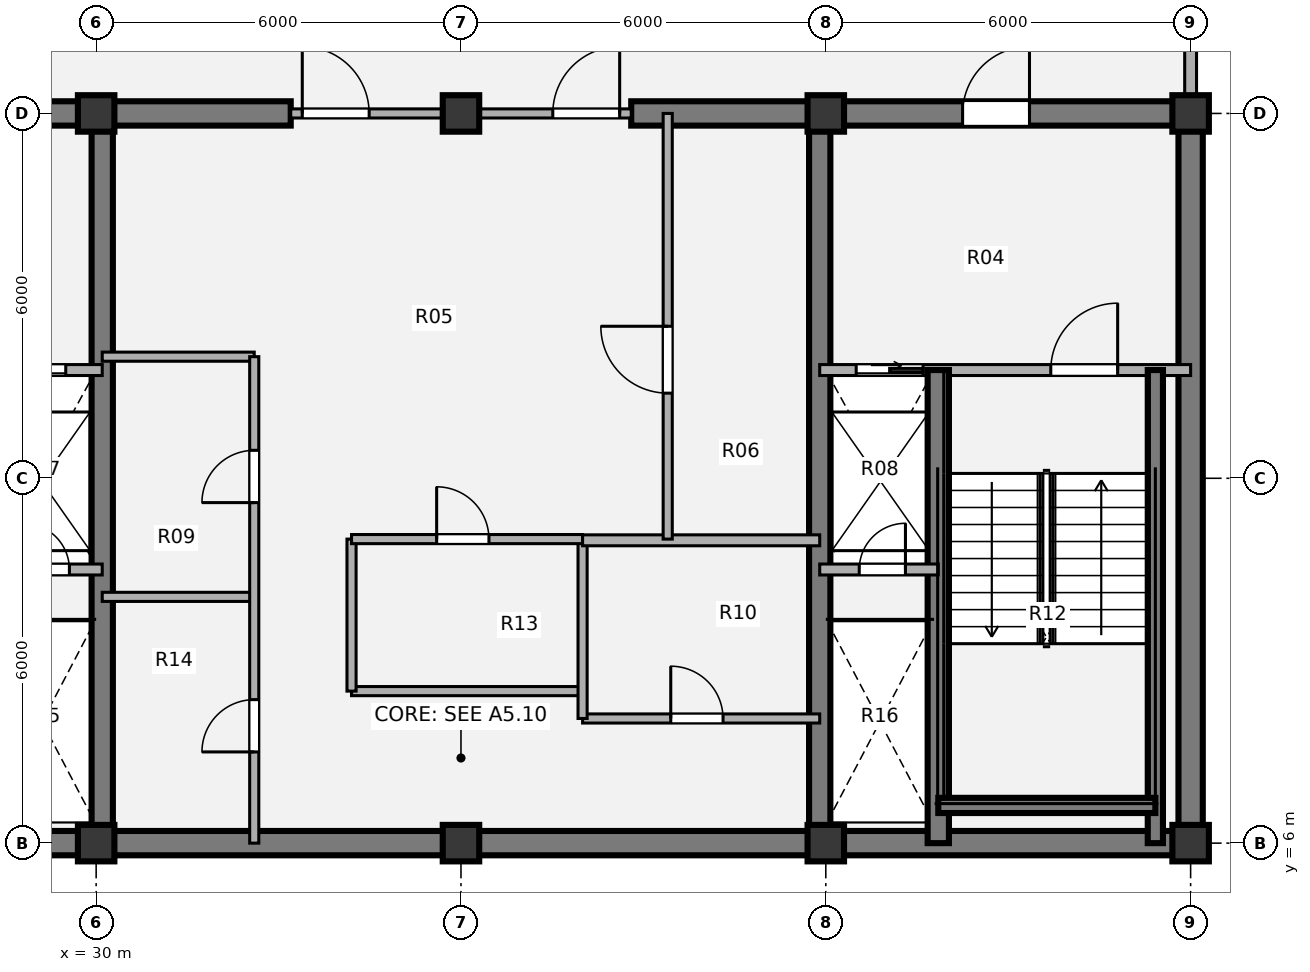
"""IFC4 building model, lengths in metres.
Left out: names, types, materials, properties, quantities, classifications, styles, units other than length and angle.
Written with IfcOpenShell. Run it as: python <this file> out.ifc"""

import sys

from ifc_helpers import new_model, si_unit, direction, frame, frame_2d, origin, origin_2d, place, context, subcontext, project, spatial, rectangle, extrude, source, transform, mapped, element, fill, save


model = new_model("IFC4")
c1 = context("Model", 3, precision=1e-05, world=origin(), true_north=direction((0.0, 1.0)))
c2 = subcontext(c1, "Body", "Model", "MODEL_VIEW")
j1 = project(units=[si_unit("LENGTHUNIT", "METRE"), si_unit("PLANEANGLEUNIT", "RADIAN")], contexts=[c1])
p1 = place(None, origin())
s1 = spatial("IfcSite", under=j1, at=p1, CompositionType="ELEMENT")
p2 = place(p1, origin())
s2 = spatial("IfcBuilding", under=s1, at=p2, CompositionType="ELEMENT")
p3 = place(p2, frame((0.0, 0.0, 299.88)))
s3 = spatial("IfcBuildingStorey", under=s2, at=p3, CompositionType="ELEMENT", Elevation=299.88)
m1 = source(origin(), c2, "Body", "SweptSolid", [
    extrude(rectangle(XDim=0.6, YDim=0.6, at=origin_2d()), origin(), (0.0, 0.0, 1.0), 3.96),
])
for number, where, z_axis, x_axis in (
    (1, (30.0, 6.0, 0.0), (0.0, 0.0, 1.0), (1.0, 0.0, 0.0)),
    (2, (36.0, 6.0, 0.0), (0.0, 0.0, 1.0), (1.0, 0.0, 0.0)),
    (3, (42.0, 6.0, 0.0), (0.0, 0.0, 1.0), (1.0, 0.0, 0.0)),
    (4, (48.0, 6.0, 0.0), (0.0, 0.0, 1.0), (1.0, 0.0, 0.0)),
    (5, (30.0, 18.0, 0.0), (0.0, 0.0, 1.0), (1.0, 0.0, 0.0)),
    (6, (36.0, 18.0, 0.0), (0.0, 0.0, 1.0), (1.0, 0.0, 0.0)),
    (7, (42.0, 18.0, 0.0), (0.0, 0.0, 1.0), (1.0, 0.0, 0.0)),
    (8, (48.0, 18.0, 0.0), (0.0, 0.0, 1.0), (1.0, 0.0, 0.0)),
):
    element("IfcColumn", number, at=place(p3, frame(where, z_axis=z_axis, x_axis=x_axis)), inside=s3, PredefinedType="COLUMN", context=c2, shape_type="MappedRepresentation", body=[
        mapped(m1, transform((0.0, 0.0, 0.0), x_axis=(1.0, 0.0, 0.0), y_axis=(0.0, 1.0, 0.0), z_axis=(0.0, 0.0, 1.0), scale=1.0)),
    ])
p4 = place(p3, frame((48.2, 6.0, 0.0), z_axis=(0.0, 0.0, 1.0), x_axis=(-1.0, 0.0, 0.0)))
e9 = element("IfcWall", 9, at=p4, inside=s3, PredefinedType="SHEAR", context=c2, shape_type="SweptSolid", body=[
    extrude(rectangle(XDim=24.4, YDim=0.4, at=frame_2d((12.2, 0.0))), origin(), (0.0, 0.0, 1.0), 3.96),
])
p5 = place(p3, frame((48.0, 18.0, 0.0), z_axis=(0.0, 0.0, 1.0), x_axis=(0.0, -1.0, 0.0)))
e10 = element("IfcWall", 10, at=p5, inside=s3, PredefinedType="SHEAR", context=c2, shape_type="SweptSolid", body=[
    extrude(rectangle(XDim=12.0, YDim=0.4, at=frame_2d((6.0, 0.0))), origin(), (0.0, 0.0, 1.0), 3.96),
])
p6 = place(p3, frame((23.8, 18.0, 0.0), z_axis=(0.0, 0.0, 1.0), x_axis=(1.0, 0.0, 0.0)))
e11 = element("IfcWall", 11, at=p6, inside=s3, PredefinedType="SHEAR", context=c2, shape_type="SweptSolid", body=[
    extrude(rectangle(XDim=9.4, YDim=0.4, at=frame_2d((4.7, 0.0))), origin(), (0.0, 0.0, 1.0), 3.96),
])
p7 = place(p6, frame((2.95, 0.0, 0.0)))
e12 = element("IfcOpeningElement", 12, at=p7, cuts=e11, PredefinedType="OPENING", context=c2, shape_type="SweptSolid", body=[
    extrude(rectangle(XDim=1.1, YDim=2.1, at=origin_2d()), frame((0.55, 0.21, 1.05), z_axis=(0.0, -1.0, 0.0), x_axis=(1.0, 0.0, 0.0)), (0.0, 0.0, 1.0), 0.42),
])
p8 = place(p3, frame((38.8, 18.0, 0.0), z_axis=(0.0, 0.0, 1.0), x_axis=(1.0, 0.0, 0.0)))
e13 = element("IfcWall", 13, at=p8, inside=s3, PredefinedType="SHEAR", context=c2, shape_type="SweptSolid", body=[
    extrude(rectangle(XDim=9.4, YDim=0.4, at=frame_2d((4.7, 0.0))), origin(), (0.0, 0.0, 1.0), 3.96),
])
p9 = place(p8, frame((5.45, 0.0, 0.0)))
e14 = element("IfcOpeningElement", 14, at=p9, cuts=e13, PredefinedType="OPENING", context=c2, shape_type="SweptSolid", body=[
    extrude(rectangle(XDim=1.1, YDim=2.1, at=origin_2d()), frame((0.55, 0.21, 1.05), z_axis=(0.0, -1.0, 0.0), x_axis=(1.0, 0.0, 0.0)), (0.0, 0.0, 1.0), 0.42),
])
for number, where, z_axis, x_axis in (
    (15, (30.1, 6.0, 0.0), (0.0, 0.0, 1.0), (0.0, 1.0, 0.0)),
    (16, (41.9, 18.0, 0.0), (0.0, 0.0, 1.0), (0.0, -1.0, 0.0)),
):
    element("IfcWall", number, at=place(p3, frame(where, z_axis=z_axis, x_axis=x_axis)), inside=s3, PredefinedType="SHEAR", context=c2, shape_type="SweptSolid", body=[
        extrude(rectangle(XDim=12.0, YDim=0.35, at=frame_2d((6.0, 0.0))), origin(), (0.0, 0.0, 1.0), 3.96),
    ])
p10 = place(p3, frame((48.0, 21.05, 0.0), z_axis=(0.0, 0.0, 1.0), x_axis=(0.0, -1.0, 0.0)))
e17 = element("IfcWall", 17, at=p10, inside=s3, PredefinedType="SOLIDWALL", context=c2, shape_type="SweptSolid", body=[
    extrude(rectangle(XDim=2.77, YDim=0.195, at=frame_2d((1.385, 0.0))), origin(), (0.0, 0.0, 1.0), 2.898),
])
p11 = place(p3, frame((30.1, 14.0, 0.0), z_axis=(0.0, 0.0, 1.0), x_axis=(1.0, 0.0, 0.0)))
e18 = element("IfcWall", 18, at=p11, inside=s3, PredefinedType="PARTITIONING", context=c2, shape_type="SweptSolid", body=[
    extrude(rectangle(XDim=2.5, YDim=0.15, at=frame_2d((1.25, 0.0))), origin(), (0.0, 0.0, 1.0), 3.68),
])
p12 = place(p3, frame((34.2, 8.5, 0.0), z_axis=(0.0, 0.0, 1.0), x_axis=(1.0, 0.0, 0.0)))
e19 = element("IfcWall", 19, at=p12, inside=s3, PredefinedType="PARTITIONING", context=c2, shape_type="SweptSolid", body=[
    extrude(rectangle(XDim=3.8, YDim=0.15, at=frame_2d((1.9, 0.0))), origin(), (0.0, 0.0, 1.0), 3.68),
])
p13 = place(p3, frame((38.0, 8.05, 0.0), z_axis=(0.0, 0.0, 1.0), x_axis=(1.0, 0.0, 0.0)))
e20 = element("IfcWall", 20, at=p13, inside=s3, PredefinedType="PARTITIONING", context=c2, shape_type="SweptSolid", body=[
    extrude(rectangle(XDim=3.9, YDim=0.15, at=frame_2d((1.95, 0.0))), origin(), (0.0, 0.0, 1.0), 3.68),
])
p14 = place(p13, frame((1.45, 0.0, 0.0)))
e21 = element("IfcOpeningElement", 21, at=p14, cuts=e20, PredefinedType="OPENING", context=c2, shape_type="SweptSolid", body=[
    extrude(rectangle(XDim=0.86, YDim=2.1, at=origin_2d()), frame((0.43, 0.085, 1.05), z_axis=(0.0, -1.0, 0.0), x_axis=(1.0, 0.0, 0.0)), (0.0, 0.0, 1.0), 0.17),
])
p15 = place(p3, frame((34.2, 8.5, 0.0), z_axis=(0.0, 0.0, 1.0), x_axis=(0.0, 1.0, 0.0)))
e22 = element("IfcWall", 22, at=p15, inside=s3, PredefinedType="PARTITIONING", context=c2, shape_type="SweptSolid", body=[
    extrude(rectangle(XDim=2.5, YDim=0.15, at=frame_2d((1.25, 0.0))), origin(), (0.0, 0.0, 1.0), 3.68),
])
p16 = place(p3, frame((38.0, 8.05, 0.0), z_axis=(0.0, 0.0, 1.0), x_axis=(0.0, 1.0, 0.0)))
e23 = element("IfcWall", 23, at=p16, inside=s3, PredefinedType="PARTITIONING", context=c2, shape_type="SweptSolid", body=[
    extrude(rectangle(XDim=2.95, YDim=0.15, at=frame_2d((1.475, 0.0))), origin(), (0.0, 0.0, 1.0), 3.68),
])
p17 = place(p3, frame((34.2, 11.0, 0.0), z_axis=(0.0, 0.0, 1.0), x_axis=(1.0, 0.0, 0.0)))
e24 = element("IfcWall", 24, at=p17, inside=s3, PredefinedType="PARTITIONING", context=c2, shape_type="SweptSolid", body=[
    extrude(rectangle(XDim=3.8, YDim=0.15, at=frame_2d((1.9, 0.0))), origin(), (0.0, 0.0, 1.0), 3.68),
])
p18 = place(p17, frame((1.4, 0.0, 0.0)))
e25 = element("IfcOpeningElement", 25, at=p18, cuts=e24, PredefinedType="OPENING", context=c2, shape_type="SweptSolid", body=[
    extrude(rectangle(XDim=0.86, YDim=2.1, at=origin_2d()), frame((0.43, 0.085, 1.05), z_axis=(0.0, -1.0, 0.0), x_axis=(1.0, 0.0, 0.0)), (0.0, 0.0, 1.0), 0.17),
])
p19 = place(p3, frame((38.0, 10.98, 0.0), z_axis=(0.0, 0.0, 1.0), x_axis=(1.0, 0.0, 0.0)))
e26 = element("IfcWall", 26, at=p19, inside=s3, PredefinedType="PARTITIONING", context=c2, shape_type="SweptSolid", body=[
    extrude(rectangle(XDim=3.9, YDim=0.18, at=frame_2d((1.95, 0.0))), origin(), (0.0, 0.0, 1.0), 3.68),
])
p20 = place(p3, frame((39.4, 11.0, 0.0), z_axis=(0.0, 0.0, 1.0), x_axis=(0.0, 1.0, 0.0)))
e27 = element("IfcWall", 27, at=p20, inside=s3, PredefinedType="PARTITIONING", context=c2, shape_type="SweptSolid", body=[
    extrude(rectangle(XDim=7.0, YDim=0.15, at=frame_2d((3.5, 0.0))), origin(), (0.0, 0.0, 1.0), 3.68),
])
p21 = place(p20, frame((2.4, 0.0, 0.0)))
e28 = element("IfcOpeningElement", 28, at=p21, cuts=e27, PredefinedType="OPENING", context=c2, shape_type="SweptSolid", body=[
    extrude(rectangle(XDim=1.1, YDim=2.1, at=origin_2d()), frame((0.55, 0.085, 1.05), z_axis=(0.0, -1.0, 0.0), x_axis=(1.0, 0.0, 0.0)), (0.0, 0.0, 1.0), 0.17),
])
p22 = place(p3, frame((30.1, 10.05, 0.0), z_axis=(0.0, 0.0, 1.0), x_axis=(1.0, 0.0, 0.0)))
e29 = element("IfcWall", 29, at=p22, inside=s3, PredefinedType="PARTITIONING", context=c2, shape_type="SweptSolid", body=[
    extrude(rectangle(XDim=2.5, YDim=0.15, at=frame_2d((1.25, 0.0))), origin(), (0.0, 0.0, 1.0), 3.68),
])
p23 = place(p3, frame((32.6, 6.0, 0.0), z_axis=(0.0, 0.0, 1.0), x_axis=(0.0, 1.0, 0.0)))
e30 = element("IfcWall", 30, at=p23, inside=s3, PredefinedType="PARTITIONING", context=c2, shape_type="SweptSolid", body=[
    extrude(rectangle(XDim=8.0, YDim=0.15, at=frame_2d((4.0, 0.0))), origin(), (0.0, 0.0, 1.0), 3.68),
])
p24 = place(p23, frame((1.5, 0.0, 0.0)))
e31 = element("IfcOpeningElement", 31, at=p24, cuts=e30, PredefinedType="OPENING", context=c2, shape_type="SweptSolid", body=[
    extrude(rectangle(XDim=0.86, YDim=2.1, at=origin_2d()), frame((0.43, 0.085, 1.05), z_axis=(0.0, -1.0, 0.0), x_axis=(1.0, 0.0, 0.0)), (0.0, 0.0, 1.0), 0.17),
])
p25 = place(p23, frame((5.6, 0.0, 0.0)))
e32 = element("IfcOpeningElement", 32, at=p25, cuts=e30, PredefinedType="OPENING", context=c2, shape_type="SweptSolid", body=[
    extrude(rectangle(XDim=0.86, YDim=2.1, at=origin_2d()), frame((0.43, 0.085, 1.05), z_axis=(0.0, -1.0, 0.0), x_axis=(1.0, 0.0, 0.0)), (0.0, 0.0, 1.0), 0.17),
])
p26 = place(p3, frame((33.2, 18.0, 0.0), z_axis=(0.0, 0.0, 1.0), x_axis=(1.0, 0.0, 0.0)))
e33 = element("IfcWall", 33, at=p26, inside=s3, PredefinedType="PARTITIONING", context=c2, shape_type="SweptSolid", body=[
    extrude(rectangle(XDim=5.6, YDim=0.15, at=frame_2d((2.8, 0.0))), origin(), (0.0, 0.0, 1.0), 2.695),
])
p27 = place(p26, frame((0.19, 0.0, 0.0)))
e34 = element("IfcOpeningElement", 34, at=p27, cuts=e33, PredefinedType="OPENING", context=c2, shape_type="SweptSolid", body=[
    extrude(rectangle(XDim=1.1, YDim=2.1, at=origin_2d()), frame((0.55, 0.085, 1.05), z_axis=(0.0, -1.0, 0.0), x_axis=(1.0, 0.0, 0.0)), (0.0, 0.0, 1.0), 0.17),
])
p28 = place(p26, frame((4.31, 0.0, 0.0)))
e35 = element("IfcOpeningElement", 35, at=p28, cuts=e33, PredefinedType="OPENING", context=c2, shape_type="SweptSolid", body=[
    extrude(rectangle(XDim=1.1, YDim=2.1, at=origin_2d()), frame((0.55, 0.085, 1.05), z_axis=(0.0, -1.0, 0.0), x_axis=(1.0, 0.0, 0.0)), (0.0, 0.0, 1.0), 0.17),
])
p29 = place(p3, frame((24.0, 13.78, 0.0), z_axis=(0.0, 0.0, 1.0), x_axis=(1.0, 0.0, 0.0)))
e36 = element("IfcWall", 36, at=p29, inside=s3, PredefinedType="PARTITIONING", context=c2, shape_type="SweptSolid", body=[
    extrude(rectangle(XDim=6.1, YDim=0.18, at=frame_2d((3.05, 0.0))), origin(), (0.0, 0.0, 1.0), 3.68),
])
p30 = place(p29, frame((1.15, 0.0, 0.0)))
e37 = element("IfcOpeningElement", 37, at=p30, cuts=e36, PredefinedType="OPENING", context=c2, shape_type="SweptSolid", body=[
    extrude(rectangle(XDim=1.1, YDim=2.1, at=origin_2d()), frame((0.55, 0.1, 1.05), z_axis=(0.0, -1.0, 0.0), x_axis=(1.0, 0.0, 0.0)), (0.0, 0.0, 1.0), 0.2),
])
p31 = place(p29, frame((4.4, 0.0, 0.0)))
e38 = element("IfcOpeningElement", 38, at=p31, cuts=e36, PredefinedType="OPENING", context=c2, shape_type="SweptSolid", body=[
    extrude(rectangle(XDim=1.1, YDim=2.1, at=origin_2d()), frame((0.55, 0.1, 1.05), z_axis=(0.0, -1.0, 0.0), x_axis=(1.0, 0.0, 0.0)), (0.0, 0.0, 1.0), 0.2),
])
p32 = place(p3, frame((28.15, 10.5, 0.0), z_axis=(0.0, 0.0, 1.0), x_axis=(1.0, 0.0, 0.0)))
e39 = element("IfcWall", 39, at=p32, inside=s3, PredefinedType="PARTITIONING", context=c2, shape_type="SweptSolid", body=[
    extrude(rectangle(XDim=1.95, YDim=0.18, at=frame_2d((0.975, 0.0))), origin(), (0.0, 0.0, 1.0), 3.68),
])
p33 = place(p32, frame((0.65, 0.0, 0.0)))
e40 = element("IfcOpeningElement", 40, at=p33, cuts=e39, PredefinedType="OPENING", context=c2, shape_type="SweptSolid", body=[
    extrude(rectangle(XDim=0.76, YDim=2.05, at=origin_2d()), frame((0.38, 0.1, 1.025), z_axis=(0.0, -1.0, 0.0), x_axis=(1.0, 0.0, 0.0)), (0.0, 0.0, 1.0), 0.2),
])
p34 = place(p3, frame((41.9, 13.78, 0.0), z_axis=(0.0, 0.0, 1.0), x_axis=(1.0, 0.0, 0.0)))
e41 = element("IfcWall", 41, at=p34, inside=s3, PredefinedType="PARTITIONING", context=c2, shape_type="SweptSolid", body=[
    extrude(rectangle(XDim=6.1, YDim=0.18, at=frame_2d((3.05, 0.0))), origin(), (0.0, 0.0, 1.0), 3.68),
])
p35 = place(p34, frame((0.6, 0.0, 0.0)))
e42 = element("IfcOpeningElement", 42, at=p35, cuts=e41, PredefinedType="OPENING", context=c2, shape_type="SweptSolid", body=[
    extrude(rectangle(XDim=1.1, YDim=2.1, at=origin_2d()), frame((0.55, 0.1, 1.05), z_axis=(0.0, -1.0, 0.0), x_axis=(1.0, 0.0, 0.0)), (0.0, 0.0, 1.0), 0.2),
])
p36 = place(p34, frame((3.8, 0.0, 0.0)))
e43 = element("IfcOpeningElement", 43, at=p36, cuts=e41, PredefinedType="OPENING", context=c2, shape_type="SweptSolid", body=[
    extrude(rectangle(XDim=1.1, YDim=2.1, at=origin_2d()), frame((0.55, 0.1, 1.05), z_axis=(0.0, -1.0, 0.0), x_axis=(1.0, 0.0, 0.0)), (0.0, 0.0, 1.0), 0.2),
])
p37 = place(p3, frame((43.85, 6.0, 0.0), z_axis=(0.0, 0.0, 1.0), x_axis=(0.0, 1.0, 0.0)))
e44 = element("IfcWall", 44, at=p37, inside=s3, PredefinedType="SHEAR", context=c2, shape_type="SweptSolid", body=[
    extrude(rectangle(XDim=7.78, YDim=0.35, at=frame_2d((3.89, 0.0))), origin(), (0.0, 0.0, 1.0), 4.03),
])
p38 = place(p3, frame((47.42, 6.0, 0.0), z_axis=(0.0, 0.0, 1.0), x_axis=(0.0, 1.0, 0.0)))
e45 = element("IfcWall", 45, at=p38, inside=s3, PredefinedType="SHEAR", context=c2, shape_type="SweptSolid", body=[
    extrude(rectangle(XDim=7.78, YDim=0.25, at=frame_2d((3.89, 0.0))), origin(), (0.0, 0.0, 1.0), 4.03),
])
p39 = place(p3, frame((43.85, 6.62, 0.0), z_axis=(0.0, 0.0, 1.0), x_axis=(1.0, 0.0, 0.0)))
e46 = element("IfcWall", 46, at=p39, inside=s3, PredefinedType="SHEAR", context=c2, shape_type="SweptSolid", body=[
    extrude(rectangle(XDim=3.57, YDim=0.25, at=frame_2d((1.785, 0.0))), origin(), (0.0, 0.0, 1.0), 4.03),
])
p40 = place(p3, frame((41.9, 10.5, 0.0), z_axis=(0.0, 0.0, 1.0), x_axis=(1.0, 0.0, 0.0)))
e47 = element("IfcWall", 47, at=p40, inside=s3, PredefinedType="PARTITIONING", context=c2, shape_type="SweptSolid", body=[
    extrude(rectangle(XDim=1.95, YDim=0.18, at=frame_2d((0.975, 0.0))), origin(), (0.0, 0.0, 1.0), 3.68),
])
p41 = place(p40, frame((0.65, 0.0, 0.0)))
e48 = element("IfcOpeningElement", 48, at=p41, cuts=e47, PredefinedType="OPENING", context=c2, shape_type="SweptSolid", body=[
    extrude(rectangle(XDim=0.76, YDim=2.05, at=origin_2d()), frame((0.38, 0.1, 1.025), z_axis=(0.0, -1.0, 0.0), x_axis=(1.0, 0.0, 0.0)), (0.0, 0.0, 1.0), 0.2),
])
m2 = source(origin(), c2, "Body", "SweptSolid", [
    extrude(rectangle(XDim=0.86, YDim=2.1, at=origin_2d()), frame((0.43, 0.025, 1.05), z_axis=(0.0, -1.0, 0.0), x_axis=(1.0, 0.0, 0.0)), (0.0, 0.0, 1.0), 0.05),
])
p42 = place(p14, origin())
e49 = element("IfcDoor", 49, at=p42, inside=s3, OperationType="SINGLE_SWING_LEFT", PredefinedType="DOOR", context=c2, shape_type="MappedRepresentation", body=[
    mapped(m2, transform((0.0, 0.0, 0.0), x_axis=(1.0, 0.0, 0.0), y_axis=(0.0, 1.0, 0.0), z_axis=(0.0, 0.0, 1.0), scale=1.0)),
])
fill(e21, e49)
p43 = place(p18, origin())
e50 = element("IfcDoor", 50, at=p43, inside=s3, OperationType="SINGLE_SWING_LEFT", PredefinedType="DOOR", context=c2, shape_type="MappedRepresentation", body=[
    mapped(m2, transform((0.0, 0.0, 0.0), x_axis=(1.0, 0.0, 0.0), y_axis=(0.0, 1.0, 0.0), z_axis=(0.0, 0.0, 1.0), scale=1.0)),
])
fill(e25, e50)
m3 = source(origin(), c2, "Body", "SweptSolid", [
    extrude(rectangle(XDim=1.1, YDim=2.1, at=origin_2d()), frame((0.55, 0.025, 1.05), z_axis=(0.0, -1.0, 0.0), x_axis=(1.0, 0.0, 0.0)), (0.0, 0.0, 1.0), 0.05),
])
p44 = place(p21, origin())
e51 = element("IfcDoor", 51, at=p44, inside=s3, OperationType="SINGLE_SWING_RIGHT", PredefinedType="DOOR", context=c2, shape_type="MappedRepresentation", body=[
    mapped(m3, transform((0.0, 0.0, 0.0), x_axis=(1.0, 0.0, 0.0), y_axis=(0.0, 1.0, 0.0), z_axis=(0.0, 0.0, 1.0), scale=1.0)),
])
fill(e28, e51)
p45 = place(p24, origin())
e52 = element("IfcDoor", 52, at=p45, inside=s3, OperationType="SINGLE_SWING_LEFT", PredefinedType="DOOR", context=c2, shape_type="MappedRepresentation", body=[
    mapped(m2, transform((0.0, 0.0, 0.0), x_axis=(1.0, 0.0, 0.0), y_axis=(0.0, 1.0, 0.0), z_axis=(0.0, 0.0, 1.0), scale=1.0)),
])
fill(e31, e52)
p46 = place(p25, origin())
e53 = element("IfcDoor", 53, at=p46, inside=s3, OperationType="SINGLE_SWING_LEFT", PredefinedType="DOOR", context=c2, shape_type="MappedRepresentation", body=[
    mapped(m2, transform((0.0, 0.0, 0.0), x_axis=(1.0, 0.0, 0.0), y_axis=(0.0, 1.0, 0.0), z_axis=(0.0, 0.0, 1.0), scale=1.0)),
])
fill(e32, e53)
m4 = source(origin(), c2, "Body", "SweptSolid", [
    extrude(rectangle(XDim=1.1, YDim=2.1, at=origin_2d()), frame((0.55, 0.025, 1.05), z_axis=(0.0, -1.0, 0.0), x_axis=(1.0, 0.0, 0.0)), (0.0, 0.0, 1.0), 0.05),
])
p47 = place(p27, origin())
e54 = element("IfcDoor", 54, at=p47, inside=s3, OperationType="SINGLE_SWING_LEFT", PredefinedType="DOOR", context=c2, shape_type="MappedRepresentation", body=[
    mapped(m4, transform((0.0, 0.0, 0.0), x_axis=(1.0, 0.0, 0.0), y_axis=(0.0, 1.0, 0.0), z_axis=(0.0, 0.0, 1.0), scale=1.0)),
])
fill(e34, e54)
p48 = place(p28, origin())
e55 = element("IfcDoor", 55, at=p48, inside=s3, OperationType="SINGLE_SWING_RIGHT", PredefinedType="DOOR", context=c2, shape_type="MappedRepresentation", body=[
    mapped(m4, transform((0.0, 0.0, 0.0), x_axis=(1.0, 0.0, 0.0), y_axis=(0.0, 1.0, 0.0), z_axis=(0.0, 0.0, 1.0), scale=1.0)),
])
fill(e35, e55)
m5 = source(origin(), c2, "Body", "SweptSolid", [
    extrude(rectangle(XDim=1.1, YDim=2.1, at=origin_2d()), frame((0.55, 0.025, 1.05), z_axis=(0.0, -1.0, 0.0), x_axis=(1.0, 0.0, 0.0)), (0.0, 0.0, 1.0), 0.05),
])
p49 = place(p31, origin())
e56 = element("IfcDoor", 56, at=p49, inside=s3, OperationType="SLIDING_TO_LEFT", PredefinedType="DOOR", context=c2, shape_type="MappedRepresentation", body=[
    mapped(m5, transform((0.0, 0.0, 0.0), x_axis=(1.0, 0.0, 0.0), y_axis=(0.0, 1.0, 0.0), z_axis=(0.0, 0.0, 1.0), scale=1.0)),
])
fill(e38, e56)
m6 = source(origin(), c2, "Body", "SweptSolid", [
    extrude(rectangle(XDim=0.76, YDim=2.05, at=origin_2d()), frame((0.38, 0.025, 1.025), z_axis=(0.0, -1.0, 0.0), x_axis=(1.0, 0.0, 0.0)), (0.0, 0.0, 1.0), 0.05),
])
p50 = place(p33, origin())
e57 = element("IfcDoor", 57, at=p50, inside=s3, OperationType="SINGLE_SWING_LEFT", PredefinedType="DOOR", context=c2, shape_type="MappedRepresentation", body=[
    mapped(m6, transform((0.0, 0.0, 0.0), x_axis=(1.0, 0.0, 0.0), y_axis=(0.0, 1.0, 0.0), z_axis=(0.0, 0.0, 1.0), scale=1.0)),
])
fill(e40, e57)
p51 = place(p35, origin())
e58 = element("IfcDoor", 58, at=p51, inside=s3, OperationType="SLIDING_TO_RIGHT", PredefinedType="DOOR", context=c2, shape_type="MappedRepresentation", body=[
    mapped(m5, transform((0.0, 0.0, 0.0), x_axis=(1.0, 0.0, 0.0), y_axis=(0.0, 1.0, 0.0), z_axis=(0.0, 0.0, 1.0), scale=1.0)),
])
fill(e42, e58)
m7 = source(origin(), c2, "Body", "SweptSolid", [
    extrude(rectangle(XDim=1.1, YDim=2.1, at=origin_2d()), frame((0.55, 0.025, 1.05), z_axis=(0.0, -1.0, 0.0), x_axis=(1.0, 0.0, 0.0)), (0.0, 0.0, 1.0), 0.05),
])
p52 = place(p36, origin())
e59 = element("IfcDoor", 59, at=p52, inside=s3, OperationType="SINGLE_SWING_RIGHT", PredefinedType="DOOR", context=c2, shape_type="MappedRepresentation", body=[
    mapped(m7, transform((0.0, 0.0, 0.0), x_axis=(1.0, 0.0, 0.0), y_axis=(0.0, 1.0, 0.0), z_axis=(0.0, 0.0, 1.0), scale=1.0)),
])
fill(e43, e59)
p53 = place(p41, origin())
e60 = element("IfcDoor", 60, at=p53, inside=s3, OperationType="SINGLE_SWING_RIGHT", PredefinedType="DOOR", context=c2, shape_type="MappedRepresentation", body=[
    mapped(m6, transform((0.0, 0.0, 0.0), x_axis=(1.0, 0.0, 0.0), y_axis=(0.0, 1.0, 0.0), z_axis=(0.0, 0.0, 1.0), scale=1.0)),
])
fill(e48, e60)
p54 = place(p9, origin())
e61 = element("IfcDoor", 61, at=p54, inside=s3, OperationType="SINGLE_SWING_RIGHT", PredefinedType="DOOR", context=c2, shape_type="MappedRepresentation", body=[
    mapped(m4, transform((0.0, 0.0, 0.0), x_axis=(1.0, 0.0, 0.0), y_axis=(0.0, 1.0, 0.0), z_axis=(0.0, 0.0, 1.0), scale=1.0)),
])
fill(e14, e61)
save(model, sys.argv[1])
